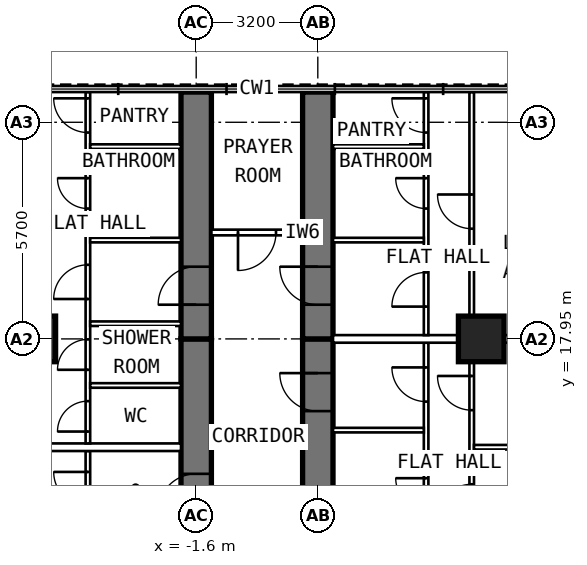
"""IFC4 building model, lengths in metres.
Left out: names, types, materials, properties, quantities, classifications, styles, units other than length and angle.
Written with IfcOpenShell. Run it as: python <this file> out.ifc"""

import sys

from ifc_helpers import new_model, si_unit, direction, frame, frame_2d, origin, origin_2d, place, context, subcontext, project, spatial, rectangle, extrude, element, fill, save


model = new_model("IFC4")
c1 = context("Model", 3, precision=1e-05, world=origin(), true_north=direction((0.0, 1.0)))
c2 = subcontext(c1, "Body", "Model", "MODEL_VIEW")
j1 = project(units=[si_unit("LENGTHUNIT", "METRE"), si_unit("PLANEANGLEUNIT", "RADIAN")], contexts=[c1])
p1 = place(None, origin())
s1 = spatial("IfcSite", under=j1, at=p1, CompositionType="ELEMENT")
p2 = place(p1, origin())
s2 = spatial("IfcBuilding", under=s1, at=p2, CompositionType="ELEMENT")
p3 = place(p2, frame((0.0, 0.0, 165.2)))
s3 = spatial("IfcBuildingStorey", under=s2, at=p3, CompositionType="ELEMENT", Elevation=165.2)
for number, where, z_axis, x_axis in (
    (1, (-5.9, 17.95, 0.0), (0.0, 0.0, 1.0), (0.0, 1.0, 0.0)),
    (2, (5.9, 17.95, 0.0), (0.0, 0.0, 1.0), (0.0, 1.0, 0.0)),
):
    element("IfcColumn", number, at=place(p3, frame(where, z_axis=z_axis, x_axis=x_axis)), inside=s3, PredefinedType="COLUMN", context=c2, shape_type="SweptSolid", body=[
        extrude(rectangle(XDim=1.2, YDim=1.2, at=origin_2d()), origin(), (0.0, 0.0, 1.0), 3.6),
    ])
p4 = place(p3, frame((-1.6, 9.6, 0.0), z_axis=(0.0, 0.0, 1.0), x_axis=(0.0, 1.0, 0.0)))
e3 = element("IfcWall", 3, at=p4, inside=s3, PredefinedType="SHEAR", context=c2, shape_type="SweptSolid", body=[
    extrude(rectangle(XDim=8.35, YDim=0.8, at=frame_2d((4.175, 0.0))), origin(), (0.0, 0.0, 1.0), 3.6),
])
p5 = place(p4, frame((3.8, 0.0, 0.0)))
e4 = element("IfcOpeningElement", 4, at=p5, cuts=e3, PredefinedType="OPENING", context=c2, shape_type="SweptSolid", body=[
    extrude(rectangle(XDim=1.0, YDim=2.1, at=frame_2d((0.5, 1.05))), frame((0.0, 0.412, 0.0), z_axis=(0.0, -1.0, 0.0), x_axis=(1.0, 0.0, 0.0)), (0.0, 0.0, 1.0), 0.824),
])
p6 = place(p3, frame((-1.6, 17.95, 0.0), z_axis=(0.0, 0.0, 1.0), x_axis=(0.0, 1.0, 0.0)))
e5 = element("IfcWall", 5, at=p6, inside=s3, PredefinedType="SHEAR", context=c2, shape_type="SweptSolid", body=[
    extrude(rectangle(XDim=6.495, YDim=0.8, at=frame_2d((3.248, 0.0))), origin(), (0.0, 0.0, 1.0), 3.6),
])
p7 = place(p6, frame((0.9, 0.0, 0.0)))
e6 = element("IfcOpeningElement", 6, at=p7, cuts=e5, PredefinedType="OPENING", context=c2, shape_type="SweptSolid", body=[
    extrude(rectangle(XDim=1.0, YDim=2.1, at=frame_2d((0.5, 1.05))), frame((0.0, 0.412, 0.0), z_axis=(0.0, -1.0, 0.0), x_axis=(1.0, 0.0, 0.0)), (0.0, 0.0, 1.0), 0.824),
])
p8 = place(p3, frame((1.6, 9.6, 0.0), z_axis=(0.0, 0.0, 1.0), x_axis=(0.0, 1.0, 0.0)))
e7 = element("IfcWall", 7, at=p8, inside=s3, PredefinedType="SHEAR", context=c2, shape_type="SweptSolid", body=[
    extrude(rectangle(XDim=8.35, YDim=0.8, at=frame_2d((4.175, 0.0))), origin(), (0.0, 0.0, 1.0), 3.6),
])
p9 = place(p8, frame((6.45, 0.0, 0.0)))
e8 = element("IfcOpeningElement", 8, at=p9, cuts=e7, PredefinedType="OPENING", context=c2, shape_type="SweptSolid", body=[
    extrude(rectangle(XDim=1.0, YDim=2.1, at=frame_2d((0.5, 1.05))), frame((0.0, 0.412, 0.0), z_axis=(0.0, -1.0, 0.0), x_axis=(1.0, 0.0, 0.0)), (0.0, 0.0, 1.0), 0.824),
])
p10 = place(p3, frame((1.6, 17.95, 0.0), z_axis=(0.0, 0.0, 1.0), x_axis=(0.0, 1.0, 0.0)))
e9 = element("IfcWall", 9, at=p10, inside=s3, PredefinedType="SHEAR", context=c2, shape_type="SweptSolid", body=[
    extrude(rectangle(XDim=6.495, YDim=0.8, at=frame_2d((3.248, 0.0))), origin(), (0.0, 0.0, 1.0), 3.6),
])
p11 = place(p10, frame((0.9, 0.0, 0.0)))
e10 = element("IfcOpeningElement", 10, at=p11, cuts=e9, PredefinedType="OPENING", context=c2, shape_type="SweptSolid", body=[
    extrude(rectangle(XDim=1.0, YDim=2.1, at=frame_2d((0.5, 1.05))), frame((0.0, 0.412, 0.0), z_axis=(0.0, -1.0, 0.0), x_axis=(1.0, 0.0, 0.0)), (0.0, 0.0, 1.0), 0.824),
])
p12 = place(p3, frame((-4.45, 10.05, 0.0), z_axis=(0.0, 0.0, 1.0), x_axis=(0.0, 1.0, 0.0)))
e11 = element("IfcWall", 11, at=p12, inside=s3, PredefinedType="PARTITIONING", context=c2, shape_type="SweptSolid", body=[
    extrude(rectangle(XDim=4.95, YDim=0.12, at=frame_2d((2.475, 0.0))), origin(), (0.0, 0.0, 1.0), 3.35),
])
p13 = place(p12, frame((1.6, 0.0, 0.0)))
e12 = element("IfcOpeningElement", 12, at=p13, cuts=e11, PredefinedType="OPENING", context=c2, shape_type="SweptSolid", body=[
    extrude(rectangle(XDim=0.8, YDim=2.1, at=frame_2d((0.4, 1.05))), frame((0.0, 0.072, 0.0), z_axis=(0.0, -1.0, 0.0), x_axis=(1.0, 0.0, 0.0)), (0.0, 0.0, 1.0), 0.144),
])
p14 = place(p12, frame((3.5, 0.0, 0.0)))
e13 = element("IfcOpeningElement", 13, at=p14, cuts=e11, PredefinedType="OPENING", context=c2, shape_type="SweptSolid", body=[
    extrude(rectangle(XDim=0.9, YDim=2.1, at=frame_2d((0.45, 1.05))), frame((0.0, 0.072, 0.0), z_axis=(0.0, -1.0, 0.0), x_axis=(1.0, 0.0, 0.0)), (0.0, 0.0, 1.0), 0.144),
])
p15 = place(p3, frame((-4.45, 15.2, 0.0), z_axis=(0.0, 0.0, 1.0), x_axis=(0.0, 1.0, 0.0)))
e14 = element("IfcWall", 14, at=p15, inside=s3, PredefinedType="PARTITIONING", context=c2, shape_type="SweptSolid", body=[
    extrude(rectangle(XDim=9.245, YDim=0.12, at=frame_2d((4.623, 0.0))), origin(), (0.0, 0.0, 1.0), 3.35),
])
p16 = place(p15, frame((0.312, 0.0, 0.0)))
e15 = element("IfcOpeningElement", 15, at=p16, cuts=e14, PredefinedType="OPENING", context=c2, shape_type="SweptSolid", body=[
    extrude(rectangle(XDim=0.8, YDim=2.1, at=frame_2d((0.4, 1.05))), frame((0.0, 0.072, 0.0), z_axis=(0.0, -1.0, 0.0), x_axis=(1.0, 0.0, 0.0)), (0.0, 0.0, 1.0), 0.144),
])
p17 = place(p15, frame((1.938, 0.0, 0.0)))
e16 = element("IfcOpeningElement", 16, at=p17, cuts=e14, PredefinedType="OPENING", context=c2, shape_type="SweptSolid", body=[
    extrude(rectangle(XDim=0.8, YDim=2.1, at=frame_2d((0.4, 1.05))), frame((0.0, 0.072, 0.0), z_axis=(0.0, -1.0, 0.0), x_axis=(1.0, 0.0, 0.0)), (0.0, 0.0, 1.0), 0.144),
])
p18 = place(p15, frame((3.8, 0.0, 0.0)))
e17 = element("IfcOpeningElement", 17, at=p18, cuts=e14, PredefinedType="OPENING", context=c2, shape_type="SweptSolid", body=[
    extrude(rectangle(XDim=0.9, YDim=2.1, at=frame_2d((0.45, 1.05))), frame((0.0, 0.072, 0.0), z_axis=(0.0, -1.0, 0.0), x_axis=(1.0, 0.0, 0.0)), (0.0, 0.0, 1.0), 0.144),
])
p19 = place(p15, frame((6.18, 0.0, 0.0)))
e18 = element("IfcOpeningElement", 18, at=p19, cuts=e14, PredefinedType="OPENING", context=c2, shape_type="SweptSolid", body=[
    extrude(rectangle(XDim=0.8, YDim=2.1, at=frame_2d((0.4, 1.05))), frame((0.0, 0.072, 0.0), z_axis=(0.0, -1.0, 0.0), x_axis=(1.0, 0.0, 0.0)), (0.0, 0.0, 1.0), 0.144),
])
p20 = place(p15, frame((8.18, 0.0, 0.0)))
e19 = element("IfcOpeningElement", 19, at=p20, cuts=e14, PredefinedType="OPENING", context=c2, shape_type="SweptSolid", body=[
    extrude(rectangle(XDim=0.9, YDim=2.1, at=frame_2d((0.45, 1.05))), frame((0.0, 0.072, 0.0), z_axis=(0.0, -1.0, 0.0), x_axis=(1.0, 0.0, 0.0)), (0.0, 0.0, 1.0), 0.144),
])
for number, where, z_axis, x_axis in (
    (20, (-2.0, 16.725, 0.0), (0.0, 0.0, 1.0), (-1.0, 0.0, 0.0)),
    (21, (-2.0, 18.35, 0.0), (0.0, 0.0, 1.0), (-1.0, 0.0, 0.0)),
    (22, (-2.0, 20.55, 0.0), (0.0, 0.0, 1.0), (-1.0, 0.0, 0.0)),
    (23, (-2.0, 23.01, 0.0), (0.0, 0.0, 1.0), (-1.0, 0.0, 0.0)),
):
    element("IfcWall", number, at=place(p3, frame(where, z_axis=z_axis, x_axis=x_axis)), inside=s3, PredefinedType="PARTITIONING", context=c2, shape_type="SweptSolid", body=[
        extrude(rectangle(XDim=2.39, YDim=0.12, at=frame_2d((1.195, 0.0))), origin(), (0.0, 0.0, 1.0), 3.35),
    ])
p21 = place(p3, frame((-2.0, 15.1, 0.0), z_axis=(0.0, 0.0, 1.0), x_axis=(-1.0, 0.0, 0.0)))
e24 = element("IfcWall", 24, at=p21, inside=s3, PredefinedType="PARTITIONING", context=c2, shape_type="SweptSolid", body=[
    extrude(rectangle(XDim=8.7, YDim=0.2, at=frame_2d((4.35, 0.0))), origin(), (0.0, 0.0, 1.0), 3.35),
])
p22 = place(p3, frame((4.45, 10.05, 0.0), z_axis=(0.0, 0.0, 1.0), x_axis=(0.0, 1.0, 0.0)))
e25 = element("IfcWall", 25, at=p22, inside=s3, PredefinedType="PARTITIONING", context=c2, shape_type="SweptSolid", body=[
    extrude(rectangle(XDim=7.8, YDim=0.12, at=frame_2d((3.9, 0.0))), origin(), (0.0, 0.0, 1.0), 3.35),
])
p23 = place(p22, frame((0.61, 0.0, 0.0)))
e26 = element("IfcOpeningElement", 26, at=p23, cuts=e25, PredefinedType="OPENING", context=c2, shape_type="SweptSolid", body=[
    extrude(rectangle(XDim=0.9, YDim=2.1, at=frame_2d((0.45, 1.05))), frame((0.0, 0.072, 0.0), z_axis=(0.0, -1.0, 0.0), x_axis=(1.0, 0.0, 0.0)), (0.0, 0.0, 1.0), 0.144),
])
p24 = place(p22, frame((3.435, 0.0, 0.0)))
e27 = element("IfcOpeningElement", 27, at=p24, cuts=e25, PredefinedType="OPENING", context=c2, shape_type="SweptSolid", body=[
    extrude(rectangle(XDim=0.8, YDim=2.1, at=frame_2d((0.4, 1.05))), frame((0.0, 0.072, 0.0), z_axis=(0.0, -1.0, 0.0), x_axis=(1.0, 0.0, 0.0)), (0.0, 0.0, 1.0), 0.144),
])
p25 = place(p22, frame((6.25, 0.0, 0.0)))
e28 = element("IfcOpeningElement", 28, at=p25, cuts=e25, PredefinedType="OPENING", context=c2, shape_type="SweptSolid", body=[
    extrude(rectangle(XDim=0.9, YDim=2.1, at=frame_2d((0.45, 1.05))), frame((0.0, 0.072, 0.0), z_axis=(0.0, -1.0, 0.0), x_axis=(1.0, 0.0, 0.0)), (0.0, 0.0, 1.0), 0.144),
])
p26 = place(p3, frame((5.65, 9.6, 0.0), z_axis=(0.0, 0.0, 1.0), x_axis=(0.0, 1.0, 0.0)))
e29 = element("IfcWall", 29, at=p26, inside=s3, PredefinedType="PARTITIONING", context=c2, shape_type="SweptSolid", body=[
    extrude(rectangle(XDim=8.1, YDim=0.12, at=frame_2d((4.05, 0.0))), origin(), (0.0, 0.0, 1.0), 3.35),
])
p27 = place(p26, frame((1.0, 0.0, 0.0)))
e30 = element("IfcOpeningElement", 30, at=p27, cuts=e29, PredefinedType="OPENING", context=c2, shape_type="SweptSolid", body=[
    extrude(rectangle(XDim=0.9, YDim=2.1, at=frame_2d((0.45, 1.05))), frame((0.0, 0.072, 0.0), z_axis=(0.0, -1.0, 0.0), x_axis=(1.0, 0.0, 0.0)), (0.0, 0.0, 1.0), 0.144),
])
p28 = place(p26, frame((3.625, 0.0, 0.0)))
e31 = element("IfcOpeningElement", 31, at=p28, cuts=e29, PredefinedType="OPENING", context=c2, shape_type="SweptSolid", body=[
    extrude(rectangle(XDim=0.9, YDim=2.1, at=frame_2d((0.45, 1.05))), frame((0.0, 0.072, 0.0), z_axis=(0.0, -1.0, 0.0), x_axis=(1.0, 0.0, 0.0)), (0.0, 0.0, 1.0), 0.144),
])
p29 = place(p26, frame((6.475, 0.0, 0.0)))
e32 = element("IfcOpeningElement", 32, at=p29, cuts=e29, PredefinedType="OPENING", context=c2, shape_type="SweptSolid", body=[
    extrude(rectangle(XDim=0.9, YDim=2.1, at=frame_2d((0.45, 1.05))), frame((0.0, 0.072, 0.0), z_axis=(0.0, -1.0, 0.0), x_axis=(1.0, 0.0, 0.0)), (0.0, 0.0, 1.0), 0.144),
])
p30 = place(p3, frame((5.71, 15.1, 0.0), z_axis=(0.0, 0.0, 1.0), x_axis=(1.0, 0.0, 0.0)))
e33 = element("IfcWall", 33, at=p30, inside=s3, PredefinedType="PARTITIONING", context=c2, shape_type="SweptSolid", body=[
    extrude(rectangle(XDim=4.99, YDim=0.12, at=frame_2d((2.495, 0.0))), origin(), (0.0, 0.0, 1.0), 3.35),
])
p31 = place(p3, frame((2.0, 15.55, 0.0), z_axis=(0.0, 0.0, 1.0), x_axis=(1.0, 0.0, 0.0)))
e34 = element("IfcWall", 34, at=p31, inside=s3, PredefinedType="PARTITIONING", context=c2, shape_type="SweptSolid", body=[
    extrude(rectangle(XDim=2.39, YDim=0.12, at=frame_2d((1.195, 0.0))), origin(), (0.0, 0.0, 1.0), 3.35),
])
p32 = place(p3, frame((4.45, 18.05, 0.0), z_axis=(0.0, 0.0, 1.0), x_axis=(0.0, 1.0, 0.0)))
e35 = element("IfcWall", 35, at=p32, inside=s3, PredefinedType="PARTITIONING", context=c2, shape_type="SweptSolid", body=[
    extrude(rectangle(XDim=6.395, YDim=0.12, at=frame_2d((3.198, 0.0))), origin(), (0.0, 0.0, 1.0), 3.35),
])
p33 = place(p32, frame((0.75, 0.0, 0.0)))
e36 = element("IfcOpeningElement", 36, at=p33, cuts=e35, PredefinedType="OPENING", context=c2, shape_type="SweptSolid", body=[
    extrude(rectangle(XDim=0.9, YDim=2.1, at=frame_2d((0.45, 1.05))), frame((0.0, 0.072, 0.0), z_axis=(0.0, -1.0, 0.0), x_axis=(1.0, 0.0, 0.0)), (0.0, 0.0, 1.0), 0.144),
])
p34 = place(p32, frame((3.33, 0.0, 0.0)))
e37 = element("IfcOpeningElement", 37, at=p34, cuts=e35, PredefinedType="OPENING", context=c2, shape_type="SweptSolid", body=[
    extrude(rectangle(XDim=0.8, YDim=2.1, at=frame_2d((0.4, 1.05))), frame((0.0, 0.072, 0.0), z_axis=(0.0, -1.0, 0.0), x_axis=(1.0, 0.0, 0.0)), (0.0, 0.0, 1.0), 0.144),
])
p35 = place(p32, frame((5.33, 0.0, 0.0)))
e38 = element("IfcOpeningElement", 38, at=p35, cuts=e35, PredefinedType="OPENING", context=c2, shape_type="SweptSolid", body=[
    extrude(rectangle(XDim=0.9, YDim=2.1, at=frame_2d((0.45, 1.05))), frame((0.0, 0.072, 0.0), z_axis=(0.0, -1.0, 0.0), x_axis=(1.0, 0.0, 0.0)), (0.0, 0.0, 1.0), 0.144),
])
p36 = place(p3, frame((5.65, 18.05, 0.0), z_axis=(0.0, 0.0, 1.0), x_axis=(0.0, 1.0, 0.0)))
e39 = element("IfcWall", 39, at=p36, inside=s3, PredefinedType="PARTITIONING", context=c2, shape_type="SweptSolid", body=[
    extrude(rectangle(XDim=6.395, YDim=0.12, at=frame_2d((3.198, 0.0))), origin(), (0.0, 0.0, 1.0), 3.35),
])
p37 = place(p36, frame((2.8, 0.0, 0.0)))
e40 = element("IfcOpeningElement", 40, at=p37, cuts=e39, PredefinedType="OPENING", context=c2, shape_type="SweptSolid", body=[
    extrude(rectangle(XDim=0.9, YDim=2.1, at=frame_2d((0.45, 1.05))), frame((0.0, 0.072, 0.0), z_axis=(0.0, -1.0, 0.0), x_axis=(1.0, 0.0, 0.0)), (0.0, 0.0, 1.0), 0.144),
])
for number, where, z_axis, x_axis in (
    (41, (2.0, 20.55, 0.0), (0.0, 0.0, 1.0), (1.0, 0.0, 0.0)),
    (42, (2.0, 23.01, 0.0), (0.0, 0.0, 1.0), (1.0, 0.0, 0.0)),
):
    element("IfcWall", number, at=place(p3, frame(where, z_axis=z_axis, x_axis=x_axis)), inside=s3, PredefinedType="PARTITIONING", context=c2, shape_type="SweptSolid", body=[
        extrude(rectangle(XDim=2.39, YDim=0.12, at=frame_2d((1.195, 0.0))), origin(), (0.0, 0.0, 1.0), 3.35),
    ])
p38 = place(p3, frame((2.0, 17.95, 0.0), z_axis=(0.0, 0.0, 1.0), x_axis=(1.0, 0.0, 0.0)))
e43 = element("IfcWall", 43, at=p38, inside=s3, PredefinedType="PARTITIONING", context=c2, shape_type="SweptSolid", body=[
    extrude(rectangle(XDim=8.7, YDim=0.2, at=frame_2d((4.35, 0.0))), origin(), (0.0, 0.0, 1.0), 2.45),
])
p39 = place(p3, frame((1.2, 20.75, 0.0), z_axis=(0.0, 0.0, 1.0), x_axis=(-1.0, 0.0, 0.0)))
e44 = element("IfcWall", 44, at=p39, inside=s3, PredefinedType="PARTITIONING", context=c2, shape_type="SweptSolid", body=[
    extrude(rectangle(XDim=2.4, YDim=0.15, at=frame_2d((1.2, 0.0))), origin(), (0.0, 0.0, 1.0), 3.35),
])
p40 = place(p39, frame((0.7, 0.0, 0.0)))
e45 = element("IfcOpeningElement", 45, at=p40, cuts=e44, PredefinedType="OPENING", context=c2, shape_type="SweptSolid", body=[
    extrude(rectangle(XDim=1.0, YDim=2.1, at=frame_2d((0.5, 1.05))), frame((0.0, 0.087, 0.0), z_axis=(0.0, -1.0, 0.0), x_axis=(1.0, 0.0, 0.0)), (0.0, 0.0, 1.0), 0.174),
])
p41 = place(p5, origin())
e46 = element("IfcDoor", 46, at=p41, inside=s3, OperationType="SINGLE_SWING_LEFT", PredefinedType="DOOR", context=c2, shape_type="SweptSolid", body=[
    extrude(rectangle(XDim=1.0, YDim=2.1, at=frame_2d((0.5, 1.05))), frame((0.0, 0.15, 0.0), z_axis=(0.0, -1.0, 0.0), x_axis=(1.0, 0.0, 0.0)), (0.0, 0.0, 1.0), 0.3),
])
fill(e4, e46)
p42 = place(p14, origin())
e47 = element("IfcDoor", 47, at=p42, inside=s3, OperationType="SINGLE_SWING_RIGHT", PredefinedType="DOOR", context=c2, shape_type="SweptSolid", body=[
    extrude(rectangle(XDim=0.9, YDim=2.1, at=frame_2d((0.45, 1.05))), frame((0.0, 0.025, 0.0), z_axis=(0.0, -1.0, 0.0), x_axis=(1.0, 0.0, 0.0)), (0.0, 0.0, 1.0), 0.05),
])
fill(e13, e47)
p43 = place(p7, origin())
e48 = element("IfcDoor", 48, at=p43, inside=s3, OperationType="SINGLE_SWING_LEFT", PredefinedType="DOOR", context=c2, shape_type="SweptSolid", body=[
    extrude(rectangle(XDim=1.0, YDim=2.1, at=frame_2d((0.5, 1.05))), frame((0.0, 0.15, 0.0), z_axis=(0.0, -1.0, 0.0), x_axis=(1.0, 0.0, 0.0)), (0.0, 0.0, 1.0), 0.3),
])
fill(e6, e48)
p44 = place(p16, origin())
e49 = element("IfcDoor", 49, at=p44, inside=s3, OperationType="SINGLE_SWING_LEFT", PredefinedType="DOOR", context=c2, shape_type="SweptSolid", body=[
    extrude(rectangle(XDim=0.8, YDim=2.1, at=frame_2d((0.4, 1.05))), frame((0.0, 0.025, 0.0), z_axis=(0.0, -1.0, 0.0), x_axis=(1.0, 0.0, 0.0)), (0.0, 0.0, 1.0), 0.05),
])
fill(e15, e49)
p45 = place(p17, origin())
e50 = element("IfcDoor", 50, at=p45, inside=s3, OperationType="SINGLE_SWING_LEFT", PredefinedType="DOOR", context=c2, shape_type="SweptSolid", body=[
    extrude(rectangle(XDim=0.8, YDim=2.1, at=frame_2d((0.4, 1.05))), frame((0.0, 0.025, 0.0), z_axis=(0.0, -1.0, 0.0), x_axis=(1.0, 0.0, 0.0)), (0.0, 0.0, 1.0), 0.05),
])
fill(e16, e50)
p46 = place(p18, origin())
e51 = element("IfcDoor", 51, at=p46, inside=s3, OperationType="SINGLE_SWING_LEFT", PredefinedType="DOOR", context=c2, shape_type="SweptSolid", body=[
    extrude(rectangle(XDim=0.9, YDim=2.1, at=frame_2d((0.45, 1.05))), frame((0.0, 0.025, 0.0), z_axis=(0.0, -1.0, 0.0), x_axis=(1.0, 0.0, 0.0)), (0.0, 0.0, 1.0), 0.05),
])
fill(e17, e51)
p47 = place(p19, origin())
e52 = element("IfcDoor", 52, at=p47, inside=s3, OperationType="SINGLE_SWING_RIGHT", PredefinedType="DOOR", context=c2, shape_type="SweptSolid", body=[
    extrude(rectangle(XDim=0.8, YDim=2.1, at=frame_2d((0.4, 1.05))), frame((0.0, 0.025, 0.0), z_axis=(0.0, -1.0, 0.0), x_axis=(1.0, 0.0, 0.0)), (0.0, 0.0, 1.0), 0.05),
])
fill(e18, e52)
p48 = place(p20, origin())
e53 = element("IfcDoor", 53, at=p48, inside=s3, OperationType="SINGLE_SWING_RIGHT", PredefinedType="DOOR", context=c2, shape_type="SweptSolid", body=[
    extrude(rectangle(XDim=0.9, YDim=2.1, at=frame_2d((0.45, 1.05))), frame((0.0, 0.025, 0.0), z_axis=(0.0, -1.0, 0.0), x_axis=(1.0, 0.0, 0.0)), (0.0, 0.0, 1.0), 0.05),
])
fill(e19, e53)
p49 = place(p9, origin())
e54 = element("IfcDoor", 54, at=p49, inside=s3, OperationType="SINGLE_SWING_RIGHT", PredefinedType="DOOR", context=c2, shape_type="SweptSolid", body=[
    extrude(rectangle(XDim=1.0, YDim=2.1, at=frame_2d((0.5, 1.05))), frame((0.0, 0.15, 0.0), z_axis=(0.0, -1.0, 0.0), x_axis=(1.0, 0.0, 0.0)), (0.0, 0.0, 1.0), 0.3),
])
fill(e8, e54)
p50 = place(p28, origin())
e55 = element("IfcDoor", 55, at=p50, inside=s3, OperationType="SINGLE_SWING_LEFT", PredefinedType="DOOR", context=c2, shape_type="SweptSolid", body=[
    extrude(rectangle(XDim=0.9, YDim=2.1, at=frame_2d((0.45, 1.05))), frame((0.0, 0.025, 0.0), z_axis=(0.0, -1.0, 0.0), x_axis=(1.0, 0.0, 0.0)), (0.0, 0.0, 1.0), 0.05),
])
fill(e31, e55)
p51 = place(p29, origin())
e56 = element("IfcDoor", 56, at=p51, inside=s3, OperationType="SINGLE_SWING_RIGHT", PredefinedType="DOOR", context=c2, shape_type="SweptSolid", body=[
    extrude(rectangle(XDim=0.9, YDim=2.1, at=frame_2d((0.45, 1.05))), frame((0.0, 0.025, 0.0), z_axis=(0.0, -1.0, 0.0), x_axis=(1.0, 0.0, 0.0)), (0.0, 0.0, 1.0), 0.05),
])
fill(e32, e56)
p52 = place(p24, origin())
e57 = element("IfcDoor", 57, at=p52, inside=s3, OperationType="SINGLE_SWING_RIGHT", PredefinedType="DOOR", context=c2, shape_type="SweptSolid", body=[
    extrude(rectangle(XDim=0.8, YDim=2.1, at=frame_2d((0.4, 1.05))), frame((0.0, 0.025, 0.0), z_axis=(0.0, -1.0, 0.0), x_axis=(1.0, 0.0, 0.0)), (0.0, 0.0, 1.0), 0.05),
])
fill(e27, e57)
p53 = place(p25, origin())
e58 = element("IfcDoor", 58, at=p53, inside=s3, OperationType="SINGLE_SWING_RIGHT", PredefinedType="DOOR", context=c2, shape_type="SweptSolid", body=[
    extrude(rectangle(XDim=0.9, YDim=2.1, at=frame_2d((0.45, 1.05))), frame((0.0, 0.025, 0.0), z_axis=(0.0, -1.0, 0.0), x_axis=(1.0, 0.0, 0.0)), (0.0, 0.0, 1.0), 0.05),
])
fill(e28, e58)
p54 = place(p11, origin())
e59 = element("IfcDoor", 59, at=p54, inside=s3, OperationType="SINGLE_SWING_RIGHT", PredefinedType="DOOR", context=c2, shape_type="SweptSolid", body=[
    extrude(rectangle(XDim=1.0, YDim=2.1, at=frame_2d((0.5, 1.05))), frame((0.0, 0.15, 0.0), z_axis=(0.0, -1.0, 0.0), x_axis=(1.0, 0.0, 0.0)), (0.0, 0.0, 1.0), 0.3),
])
fill(e10, e59)
p55 = place(p37, origin())
e60 = element("IfcDoor", 60, at=p55, inside=s3, OperationType="SINGLE_SWING_RIGHT", PredefinedType="DOOR", context=c2, shape_type="SweptSolid", body=[
    extrude(rectangle(XDim=0.9, YDim=2.1, at=frame_2d((0.45, 1.05))), frame((0.0, 0.025, 0.0), z_axis=(0.0, -1.0, 0.0), x_axis=(1.0, 0.0, 0.0)), (0.0, 0.0, 1.0), 0.05),
])
fill(e40, e60)
p56 = place(p33, origin())
e61 = element("IfcDoor", 61, at=p56, inside=s3, OperationType="SINGLE_SWING_LEFT", PredefinedType="DOOR", context=c2, shape_type="SweptSolid", body=[
    extrude(rectangle(XDim=0.9, YDim=2.1, at=frame_2d((0.45, 1.05))), frame((0.0, 0.025, 0.0), z_axis=(0.0, -1.0, 0.0), x_axis=(1.0, 0.0, 0.0)), (0.0, 0.0, 1.0), 0.05),
])
fill(e36, e61)
p57 = place(p34, origin())
e62 = element("IfcDoor", 62, at=p57, inside=s3, OperationType="SINGLE_SWING_RIGHT", PredefinedType="DOOR", context=c2, shape_type="SweptSolid", body=[
    extrude(rectangle(XDim=0.8, YDim=2.1, at=frame_2d((0.4, 1.05))), frame((0.0, 0.025, 0.0), z_axis=(0.0, -1.0, 0.0), x_axis=(1.0, 0.0, 0.0)), (0.0, 0.0, 1.0), 0.05),
])
fill(e37, e62)
p58 = place(p35, origin())
e63 = element("IfcDoor", 63, at=p58, inside=s3, OperationType="SINGLE_SWING_RIGHT", PredefinedType="DOOR", context=c2, shape_type="SweptSolid", body=[
    extrude(rectangle(XDim=0.9, YDim=2.1, at=frame_2d((0.45, 1.05))), frame((0.0, 0.025, 0.0), z_axis=(0.0, -1.0, 0.0), x_axis=(1.0, 0.0, 0.0)), (0.0, 0.0, 1.0), 0.05),
])
fill(e38, e63)
p59 = place(p40, origin())
e64 = element("IfcDoor", 64, at=p59, inside=s3, OperationType="SINGLE_SWING_RIGHT", PredefinedType="DOOR", context=c2, shape_type="SweptSolid", body=[
    extrude(rectangle(XDim=1.0, YDim=2.1, at=frame_2d((0.5, 1.05))), frame((0.0, 0.025, 0.0), z_axis=(0.0, -1.0, 0.0), x_axis=(1.0, 0.0, 0.0)), (0.0, 0.0, 1.0), 0.05),
])
fill(e45, e64)
save(model, sys.argv[1])
